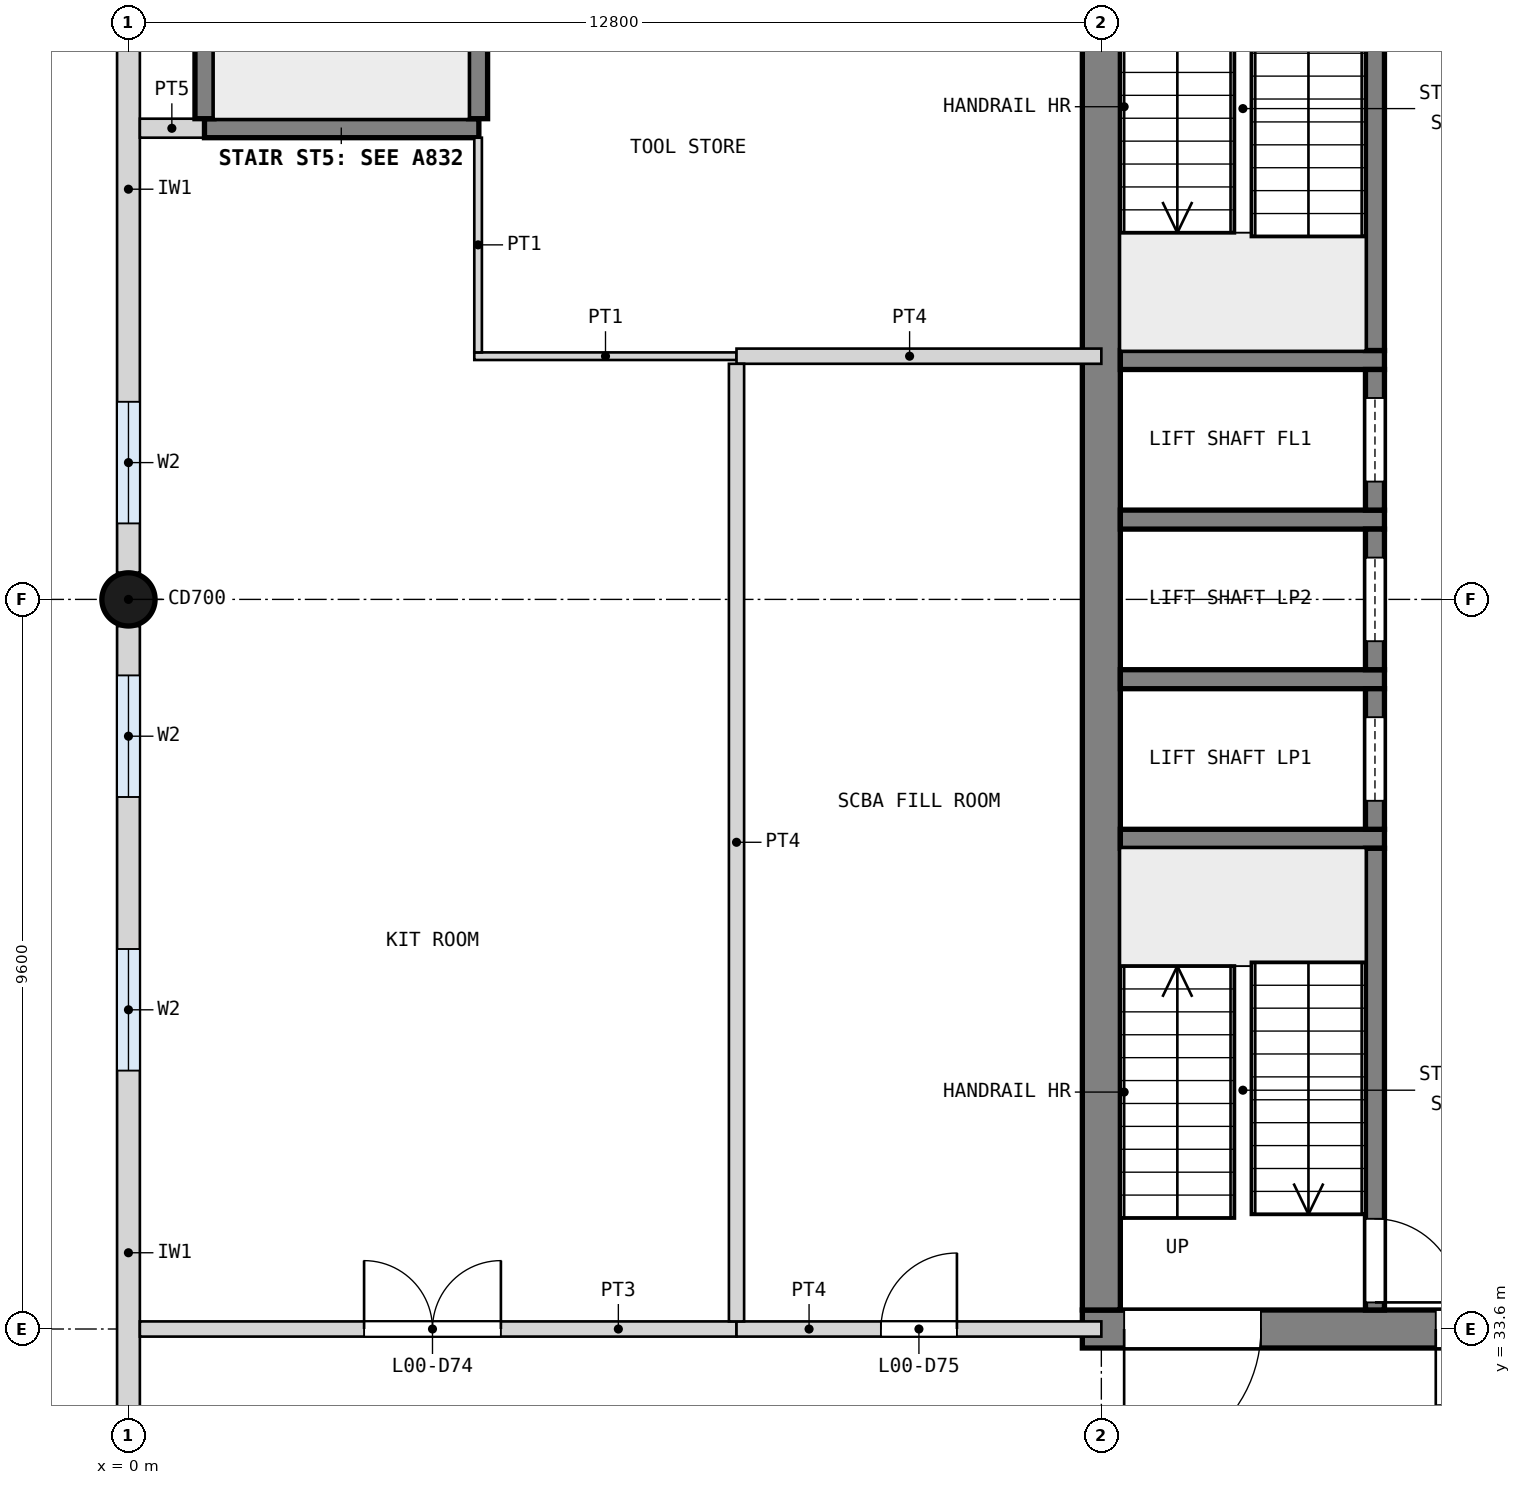
"""IFC4 building model, lengths in metres.
Left out: names, types, materials, properties, quantities, classifications, styles, units other than length and angle.
Written with IfcOpenShell. Run it as: python <this file> out.ifc"""

import sys

from ifc_helpers import new_model, si_unit, direction, frame, frame_2d, origin, origin_2d, place, context, subcontext, project, spatial, rectangle, circle, extrude, element, fill, save


model = new_model("IFC4")
c1 = context("Model", 3, precision=1e-05, world=origin(), true_north=direction((0.0, 1.0)))
c2 = subcontext(c1, "Body", "Model", "MODEL_VIEW")
j1 = project(units=[si_unit("LENGTHUNIT", "METRE"), si_unit("PLANEANGLEUNIT", "RADIAN")], contexts=[c1])
p1 = place(None, origin())
s1 = spatial("IfcSite", under=j1, at=p1, CompositionType="ELEMENT")
p2 = place(p1, origin())
s2 = spatial("IfcBuilding", under=s1, at=p2, CompositionType="ELEMENT")
p3 = place(p2, origin())
s3 = spatial("IfcBuildingStorey", under=s2, at=p3, CompositionType="ELEMENT", Elevation=0.0)
p4 = place(p3, frame((12.55, 33.6, 0.0), z_axis=(0.0, 0.0, 1.0), x_axis=(1.0, 0.0, 0.0)))
e1 = element("IfcWall", 1, at=p4, inside=s3, PredefinedType="SHEAR", context=c2, shape_type="SweptSolid", body=[
    extrude(rectangle(XDim=13.3, YDim=0.5, at=frame_2d((6.65, 0.0))), origin(), (0.0, 0.0, 1.0), 4.2),
])
p5 = place(p4, frame((4.65, 0.0, 0.0)))
e2 = element("IfcOpeningElement", 2, at=p5, cuts=e1, PredefinedType="OPENING", context=c2, shape_type="SweptSolid", body=[
    extrude(rectangle(XDim=2.0, YDim=2.1, at=frame_2d((1.0, 1.05))), frame((0.0, 0.26, 0.0), z_axis=(0.0, -1.0, 0.0), x_axis=(1.0, 0.0, 0.0)), (0.0, 0.0, 1.0), 0.52),
])
p6 = place(p4, frame((0.55, 0.0, 0.0)))
e3 = element("IfcOpeningElement", 3, at=p6, cuts=e1, PredefinedType="OPENING", context=c2, shape_type="SweptSolid", body=[
    extrude(rectangle(XDim=1.8, YDim=2.1, at=frame_2d((0.9, 1.05))), frame((0.0, 0.26, 0.0), z_axis=(0.0, -1.0, 0.0), x_axis=(1.0, 0.0, 0.0)), (0.0, 0.0, 1.0), 0.52),
])
p7 = place(p3, frame((12.8, 33.85, 0.0), z_axis=(0.0, 0.0, 1.0), x_axis=(0.0, 1.0, 0.0)))
e4 = element("IfcWall", 4, at=p7, inside=s3, PredefinedType="SHEAR", context=c2, shape_type="SweptSolid", body=[
    extrude(rectangle(XDim=18.7, YDim=0.5, at=frame_2d((9.35, 0.0))), origin(), (0.0, 0.0, 1.0), 4.2),
])
p8 = place(p3, frame((0.0, 43.2, 0.0), z_axis=(0.0, 0.0, 1.0), x_axis=(1.0, 0.0, 0.0)))
e5 = element("IfcColumn", 5, at=p8, inside=s3, PredefinedType="COLUMN", context=c2, shape_type="SweptSolid", body=[
    extrude(circle(Radius=0.35, at=origin_2d()), origin(), (0.0, 0.0, 1.0), 4.2),
])
p9 = place(p3, frame((0.0, 29.15, 0.0), z_axis=(0.0, 0.0, 1.0), x_axis=(0.0, 1.0, 0.0)))
e6 = element("IfcWall", 6, at=p9, inside=s3, PredefinedType="SOLIDWALL", context=c2, shape_type="SweptSolid", body=[
    extrude(rectangle(XDim=13.7, YDim=0.3, at=frame_2d((6.85, 0.0))), origin(), (0.0, 0.0, 1.0), 3.0),
])
p10 = place(p9, frame((1.05, 0.0, 0.0)))
e7 = element("IfcOpeningElement", 7, at=p10, cuts=e6, PredefinedType="OPENING", context=c2, shape_type="SweptSolid", body=[
    extrude(rectangle(XDim=2.0, YDim=2.1, at=frame_2d((1.0, 1.05))), frame((0.0, 0.16, 0.0), z_axis=(0.0, -1.0, 0.0), x_axis=(1.0, 0.0, 0.0)), (0.0, 0.0, 1.0), 0.32),
])
p11 = place(p9, frame((7.85, 0.0, 0.3)))
e8 = element("IfcOpeningElement", 8, at=p11, cuts=e6, PredefinedType="OPENING", context=c2, shape_type="SweptSolid", body=[
    extrude(rectangle(XDim=1.6, YDim=2.4, at=frame_2d((0.8, 1.2))), frame((0.0, 0.16, 0.0), z_axis=(0.0, -1.0, 0.0), x_axis=(1.0, 0.0, 0.0)), (0.0, 0.0, 1.0), 0.32),
])
p12 = place(p9, frame((11.45, 0.0, 0.3)))
e9 = element("IfcOpeningElement", 9, at=p12, cuts=e6, PredefinedType="OPENING", context=c2, shape_type="SweptSolid", body=[
    extrude(rectangle(XDim=1.6, YDim=2.4, at=frame_2d((0.8, 1.2))), frame((0.0, 0.16, 0.0), z_axis=(0.0, -1.0, 0.0), x_axis=(1.0, 0.0, 0.0)), (0.0, 0.0, 1.0), 0.32),
])
p13 = place(p3, frame((0.0, 43.55, 0.0), z_axis=(0.0, 0.0, 1.0), x_axis=(0.0, 1.0, 0.0)))
e10 = element("IfcWall", 10, at=p13, inside=s3, PredefinedType="SOLIDWALL", context=c2, shape_type="SweptSolid", body=[
    extrude(rectangle(XDim=13.7, YDim=0.3, at=frame_2d((6.85, 0.0))), origin(), (0.0, 0.0, 1.0), 3.0),
])
p14 = place(p13, frame((0.65, 0.0, 0.3)))
e11 = element("IfcOpeningElement", 11, at=p14, cuts=e10, PredefinedType="OPENING", context=c2, shape_type="SweptSolid", body=[
    extrude(rectangle(XDim=1.6, YDim=2.4, at=frame_2d((0.8, 1.2))), frame((0.0, 0.16, 0.0), z_axis=(0.0, -1.0, 0.0), x_axis=(1.0, 0.0, 0.0)), (0.0, 0.0, 1.0), 0.32),
])
p15 = place(p13, frame((7.85, 0.0, 0.3)))
e12 = element("IfcOpeningElement", 12, at=p15, cuts=e10, PredefinedType="OPENING", context=c2, shape_type="SweptSolid", body=[
    extrude(rectangle(XDim=1.6, YDim=2.4, at=frame_2d((0.8, 1.2))), frame((0.0, 0.16, 0.0), z_axis=(0.0, -1.0, 0.0), x_axis=(1.0, 0.0, 0.0)), (0.0, 0.0, 1.0), 0.32),
])
p16 = place(p13, frame((11.45, 0.0, 0.3)))
e13 = element("IfcOpeningElement", 13, at=p16, cuts=e10, PredefinedType="OPENING", context=c2, shape_type="SweptSolid", body=[
    extrude(rectangle(XDim=1.6, YDim=2.4, at=frame_2d((0.8, 1.2))), frame((0.0, 0.16, 0.0), z_axis=(0.0, -1.0, 0.0), x_axis=(1.0, 0.0, 0.0)), (0.0, 0.0, 1.0), 0.32),
])
for number, where, z_axis, x_axis in (
    (14, (13.05, 40.05, 0.0), (0.0, 0.0, 1.0), (1.0, 0.0, 0.0)),
    (15, (13.05, 42.15, 0.0), (0.0, 0.0, 1.0), (1.0, 0.0, 0.0)),
    (16, (13.05, 44.25, 0.0), (0.0, 0.0, 1.0), (1.0, 0.0, 0.0)),
    (17, (13.05, 46.35, 0.0), (0.0, 0.0, 1.0), (1.0, 0.0, 0.0)),
):
    element("IfcWall", number, at=place(p3, frame(where, z_axis=z_axis, x_axis=x_axis)), inside=s3, PredefinedType="SOLIDWALL", context=c2, shape_type="SweptSolid", body=[
        extrude(rectangle(XDim=3.475, YDim=0.25, at=frame_2d((1.737, 0.0))), origin(), (0.0, 0.0, 1.0), 3.9),
    ])
p17 = place(p3, frame((16.4, 33.85, 0.0), z_axis=(0.0, 0.0, 1.0), x_axis=(0.0, 1.0, 0.0)))
e18 = element("IfcWall", 18, at=p17, inside=s3, PredefinedType="SOLIDWALL", context=c2, shape_type="SweptSolid", body=[
    extrude(rectangle(XDim=6.075, YDim=0.25, at=frame_2d((3.038, 0.0))), origin(), (0.0, 0.0, 1.0), 3.9),
])
p18 = place(p17, frame((0.1, 0.0, 0.0)))
e19 = element("IfcOpeningElement", 19, at=p18, cuts=e18, PredefinedType="OPENING", context=c2, shape_type="SweptSolid", body=[
    extrude(rectangle(XDim=1.1, YDim=2.1, at=frame_2d((0.55, 1.05))), frame((0.0, 0.135, 0.0), z_axis=(0.0, -1.0, 0.0), x_axis=(1.0, 0.0, 0.0)), (0.0, 0.0, 1.0), 0.27),
])
p19 = place(p3, frame((16.4, 40.175, 0.0), z_axis=(0.0, 0.0, 1.0), x_axis=(0.0, 1.0, 0.0)))
e20 = element("IfcWall", 20, at=p19, inside=s3, PredefinedType="SOLIDWALL", context=c2, shape_type="SweptSolid", body=[
    extrude(rectangle(XDim=1.85, YDim=0.25, at=frame_2d((0.925, 0.0))), origin(), (0.0, 0.0, 1.0), 3.9),
])
p20 = place(p19, frame((0.375, 0.0, 0.0)))
e21 = element("IfcOpeningElement", 21, at=p20, cuts=e20, PredefinedType="OPENING", context=c2, shape_type="SweptSolid", body=[
    extrude(rectangle(XDim=1.1, YDim=2.1, at=frame_2d((0.55, 1.05))), frame((0.0, 0.135, 0.0), z_axis=(0.0, -1.0, 0.0), x_axis=(1.0, 0.0, 0.0)), (0.0, 0.0, 1.0), 0.27),
])
p21 = place(p3, frame((16.4, 42.275, 0.0), z_axis=(0.0, 0.0, 1.0), x_axis=(0.0, 1.0, 0.0)))
e22 = element("IfcWall", 22, at=p21, inside=s3, PredefinedType="SOLIDWALL", context=c2, shape_type="SweptSolid", body=[
    extrude(rectangle(XDim=1.85, YDim=0.25, at=frame_2d((0.925, 0.0))), origin(), (0.0, 0.0, 1.0), 3.9),
])
p22 = place(p21, frame((0.375, 0.0, 0.0)))
e23 = element("IfcOpeningElement", 23, at=p22, cuts=e22, PredefinedType="OPENING", context=c2, shape_type="SweptSolid", body=[
    extrude(rectangle(XDim=1.1, YDim=2.1, at=frame_2d((0.55, 1.05))), frame((0.0, 0.135, 0.0), z_axis=(0.0, -1.0, 0.0), x_axis=(1.0, 0.0, 0.0)), (0.0, 0.0, 1.0), 0.27),
])
p23 = place(p3, frame((16.4, 44.375, 0.0), z_axis=(0.0, 0.0, 1.0), x_axis=(0.0, 1.0, 0.0)))
e24 = element("IfcWall", 24, at=p23, inside=s3, PredefinedType="SOLIDWALL", context=c2, shape_type="SweptSolid", body=[
    extrude(rectangle(XDim=1.85, YDim=0.25, at=frame_2d((0.925, 0.0))), origin(), (0.0, 0.0, 1.0), 3.9),
])
p24 = place(p23, frame((0.375, 0.0, 0.0)))
e25 = element("IfcOpeningElement", 25, at=p24, cuts=e24, PredefinedType="OPENING", context=c2, shape_type="SweptSolid", body=[
    extrude(rectangle(XDim=1.1, YDim=2.1, at=frame_2d((0.55, 1.05))), frame((0.0, 0.135, 0.0), z_axis=(0.0, -1.0, 0.0), x_axis=(1.0, 0.0, 0.0)), (0.0, 0.0, 1.0), 0.27),
])
p25 = place(p3, frame((16.4, 46.475, 0.0), z_axis=(0.0, 0.0, 1.0), x_axis=(0.0, 1.0, 0.0)))
e26 = element("IfcWall", 26, at=p25, inside=s3, PredefinedType="SOLIDWALL", context=c2, shape_type="SweptSolid", body=[
    extrude(rectangle(XDim=6.075, YDim=0.25, at=frame_2d((3.038, 0.0))), origin(), (0.0, 0.0, 1.0), 3.9),
])
p26 = place(p25, frame((4.875, 0.0, 0.0)))
e27 = element("IfcOpeningElement", 27, at=p26, cuts=e26, PredefinedType="OPENING", context=c2, shape_type="SweptSolid", body=[
    extrude(rectangle(XDim=1.1, YDim=2.1, at=frame_2d((0.55, 1.05))), frame((0.0, 0.135, 0.0), z_axis=(0.0, -1.0, 0.0), x_axis=(1.0, 0.0, 0.0)), (0.0, 0.0, 1.0), 0.27),
])
p27 = place(p3, frame((0.15, 33.6, 0.0), z_axis=(0.0, 0.0, 1.0), x_axis=(1.0, 0.0, 0.0)))
e28 = element("IfcWall", 28, at=p27, inside=s3, PredefinedType="PARTITIONING", context=c2, shape_type="SweptSolid", body=[
    extrude(rectangle(XDim=7.85, YDim=0.2, at=frame_2d((3.925, 0.0))), origin(), (0.0, 0.0, 1.0), 3.9),
])
p28 = place(p27, frame((2.95, 0.0, 0.0)))
e29 = element("IfcOpeningElement", 29, at=p28, cuts=e28, PredefinedType="OPENING", context=c2, shape_type="SweptSolid", body=[
    extrude(rectangle(XDim=1.8, YDim=2.1, at=frame_2d((0.9, 1.05))), frame((0.0, 0.11, 0.0), z_axis=(0.0, -1.0, 0.0), x_axis=(1.0, 0.0, 0.0)), (0.0, 0.0, 1.0), 0.22),
])
p29 = place(p3, frame((8.0, 33.6, 0.0), z_axis=(0.0, 0.0, 1.0), x_axis=(1.0, 0.0, 0.0)))
e30 = element("IfcWall", 30, at=p29, inside=s3, PredefinedType="PARTITIONING", context=c2, shape_type="SweptSolid", body=[
    extrude(rectangle(XDim=4.8, YDim=0.2, at=frame_2d((2.4, 0.0))), origin(), (0.0, 0.0, 1.0), 3.9),
])
p30 = place(p29, frame((1.9, 0.0, 0.0)))
e31 = element("IfcOpeningElement", 31, at=p30, cuts=e30, PredefinedType="OPENING", context=c2, shape_type="SweptSolid", body=[
    extrude(rectangle(XDim=1.0, YDim=2.1, at=frame_2d((0.5, 1.05))), frame((0.0, 0.11, 0.0), z_axis=(0.0, -1.0, 0.0), x_axis=(1.0, 0.0, 0.0)), (0.0, 0.0, 1.0), 0.22),
])
p31 = place(p3, frame((4.55, 46.4, 0.0), z_axis=(0.0, 0.0, 1.0), x_axis=(1.0, 0.0, 0.0)))
e32 = element("IfcWall", 32, at=p31, inside=s3, PredefinedType="PARTITIONING", context=c2, shape_type="SweptSolid", body=[
    extrude(rectangle(XDim=3.45, YDim=0.1, at=frame_2d((1.725, 0.0))), origin(), (0.0, 0.0, 1.0), 3.9),
])
p32 = place(p3, frame((8.0, 46.4, 0.0), z_axis=(0.0, 0.0, 1.0), x_axis=(1.0, 0.0, 0.0)))
e33 = element("IfcWall", 33, at=p32, inside=s3, PredefinedType="PARTITIONING", context=c2, shape_type="SweptSolid", body=[
    extrude(rectangle(XDim=4.8, YDim=0.2, at=frame_2d((2.4, 0.0))), origin(), (0.0, 0.0, 1.0), 3.9),
])
p33 = place(p3, frame((0.15, 49.4, 0.0), z_axis=(0.0, 0.0, 1.0), x_axis=(1.0, 0.0, 0.0)))
e34 = element("IfcWall", 34, at=p33, inside=s3, PredefinedType="PARTITIONING", context=c2, shape_type="SweptSolid", body=[
    extrude(rectangle(XDim=0.85, YDim=0.25, at=frame_2d((0.425, 0.0))), origin(), (0.0, 0.0, 1.0), 3.9),
])
p34 = place(p3, frame((1.0, 49.4, 0.0), z_axis=(0.0, 0.0, 1.0), x_axis=(1.0, 0.0, 0.0)))
e35 = element("IfcWall", 35, at=p34, inside=s3, PredefinedType="SHEAR", context=c2, shape_type="SweptSolid", body=[
    extrude(rectangle(XDim=3.61, YDim=0.25, at=frame_2d((1.805, 0.0))), origin(), (0.0, 0.0, 1.0), 3.9),
])
p35 = place(p3, frame((1.0, 49.525, 0.0), z_axis=(0.0, 0.0, 1.0), x_axis=(0.0, 1.0, 0.0)))
e36 = element("IfcWall", 36, at=p35, inside=s3, PredefinedType="SHEAR", context=c2, shape_type="SweptSolid", body=[
    extrude(rectangle(XDim=5.75, YDim=0.25, at=frame_2d((2.875, 0.0))), origin(), (0.0, 0.0, 1.0), 3.9),
])
p36 = place(p3, frame((4.6, 46.45, 0.0), z_axis=(0.0, 0.0, 1.0), x_axis=(0.0, 1.0, 0.0)))
e37 = element("IfcWall", 37, at=p36, inside=s3, PredefinedType="PARTITIONING", context=c2, shape_type="SweptSolid", body=[
    extrude(rectangle(XDim=2.825, YDim=0.1, at=frame_2d((1.413, 0.0))), origin(), (0.0, 0.0, 1.0), 3.9),
])
p37 = place(p3, frame((4.6, 49.525, 0.0), z_axis=(0.0, 0.0, 1.0), x_axis=(0.0, 1.0, 0.0)))
e38 = element("IfcWall", 38, at=p37, inside=s3, PredefinedType="SHEAR", context=c2, shape_type="SweptSolid", body=[
    extrude(rectangle(XDim=3.175, YDim=0.25, at=frame_2d((1.587, 0.0))), origin(), (0.0, 0.0, 1.0), 3.9),
])
p38 = place(p3, frame((8.0, 33.7, 0.0), z_axis=(0.0, 0.0, 1.0), x_axis=(0.0, 1.0, 0.0)))
e39 = element("IfcWall", 39, at=p38, inside=s3, PredefinedType="PARTITIONING", context=c2, shape_type="SweptSolid", body=[
    extrude(rectangle(XDim=12.6, YDim=0.2, at=frame_2d((6.3, 0.0))), origin(), (0.0, 0.0, 1.0), 3.9),
])
p39 = place(p18, frame((1.1, 0.0, 0.0), z_axis=(0.0, 0.0, 1.0), x_axis=(-1.0, 0.0, 0.0)))
e40 = element("IfcDoor", 40, at=p39, inside=s3, OperationType="SINGLE_SWING_RIGHT", PredefinedType="DOOR", context=c2, shape_type="SweptSolid", body=[
    extrude(rectangle(XDim=1.1, YDim=2.1, at=frame_2d((0.55, 1.05))), frame((0.0, 0.025, 0.0), z_axis=(0.0, -1.0, 0.0), x_axis=(1.0, 0.0, 0.0)), (0.0, 0.0, 1.0), 0.05),
])
fill(e19, e40)
p40 = place(p20, origin())
e41 = element("IfcDoor", 41, at=p40, inside=s3, OperationType="SLIDING_TO_LEFT", PredefinedType="DOOR", context=c2, shape_type="SweptSolid", body=[
    extrude(rectangle(XDim=1.1, YDim=2.1, at=frame_2d((0.55, 1.05))), frame((0.0, 0.025, 0.0), z_axis=(0.0, -1.0, 0.0), x_axis=(1.0, 0.0, 0.0)), (0.0, 0.0, 1.0), 0.05),
])
fill(e21, e41)
p41 = place(p22, origin())
e42 = element("IfcDoor", 42, at=p41, inside=s3, OperationType="SLIDING_TO_LEFT", PredefinedType="DOOR", context=c2, shape_type="SweptSolid", body=[
    extrude(rectangle(XDim=1.1, YDim=2.1, at=frame_2d((0.55, 1.05))), frame((0.0, 0.025, 0.0), z_axis=(0.0, -1.0, 0.0), x_axis=(1.0, 0.0, 0.0)), (0.0, 0.0, 1.0), 0.05),
])
fill(e23, e42)
p42 = place(p24, origin())
e43 = element("IfcDoor", 43, at=p42, inside=s3, OperationType="SLIDING_TO_LEFT", PredefinedType="DOOR", context=c2, shape_type="SweptSolid", body=[
    extrude(rectangle(XDim=1.1, YDim=2.1, at=frame_2d((0.55, 1.05))), frame((0.0, 0.025, 0.0), z_axis=(0.0, -1.0, 0.0), x_axis=(1.0, 0.0, 0.0)), (0.0, 0.0, 1.0), 0.05),
])
fill(e25, e43)
p43 = place(p5, frame((2.0, 0.0, 0.0), z_axis=(0.0, 0.0, 1.0), x_axis=(-1.0, 0.0, 0.0)))
e44 = element("IfcDoor", 44, at=p43, inside=s3, OperationType="DOUBLE_DOOR_SINGLE_SWING", PredefinedType="DOOR", context=c2, shape_type="SweptSolid", body=[
    extrude(rectangle(XDim=2.0, YDim=2.1, at=frame_2d((1.0, 1.05))), frame((0.0, 0.025, 0.0), z_axis=(0.0, -1.0, 0.0), x_axis=(1.0, 0.0, 0.0)), (0.0, 0.0, 1.0), 0.05),
])
fill(e2, e44)
p44 = place(p6, frame((1.8, 0.0, 0.0), z_axis=(0.0, 0.0, 1.0), x_axis=(-1.0, 0.0, 0.0)))
e45 = element("IfcDoor", 45, at=p44, inside=s3, OperationType="SINGLE_SWING_RIGHT", PredefinedType="DOOR", context=c2, shape_type="SweptSolid", body=[
    extrude(rectangle(XDim=1.8, YDim=2.1, at=frame_2d((0.9, 1.05))), frame((0.0, 0.025, 0.0), z_axis=(0.0, -1.0, 0.0), x_axis=(1.0, 0.0, 0.0)), (0.0, 0.0, 1.0), 0.05),
])
fill(e3, e45)
p45 = place(p28, origin())
e46 = element("IfcDoor", 46, at=p45, inside=s3, OperationType="DOUBLE_DOOR_SINGLE_SWING", PredefinedType="DOOR", context=c2, shape_type="SweptSolid", body=[
    extrude(rectangle(XDim=1.8, YDim=2.1, at=frame_2d((0.9, 1.05))), frame((0.0, 0.025, 0.0), z_axis=(0.0, -1.0, 0.0), x_axis=(1.0, 0.0, 0.0)), (0.0, 0.0, 1.0), 0.05),
])
fill(e29, e46)
p46 = place(p30, origin())
e47 = element("IfcDoor", 47, at=p46, inside=s3, OperationType="SINGLE_SWING_RIGHT", PredefinedType="DOOR", context=c2, shape_type="SweptSolid", body=[
    extrude(rectangle(XDim=1.0, YDim=2.1, at=frame_2d((0.5, 1.05))), frame((0.0, 0.025, 0.0), z_axis=(0.0, -1.0, 0.0), x_axis=(1.0, 0.0, 0.0)), (0.0, 0.0, 1.0), 0.05),
])
fill(e31, e47)
p47 = place(p11, origin())
e48 = element("IfcWindow", 48, at=p47, inside=s3, PartitioningType="SINGLE_PANEL", PredefinedType="WINDOW", context=c2, shape_type="SweptSolid", body=[
    extrude(rectangle(XDim=1.6, YDim=2.4, at=frame_2d((0.8, 1.2))), frame((0.0, 0.03, 0.0), z_axis=(0.0, -1.0, 0.0), x_axis=(1.0, 0.0, 0.0)), (0.0, 0.0, 1.0), 0.06),
])
fill(e8, e48)
p48 = place(p12, origin())
e49 = element("IfcWindow", 49, at=p48, inside=s3, PartitioningType="SINGLE_PANEL", PredefinedType="WINDOW", context=c2, shape_type="SweptSolid", body=[
    extrude(rectangle(XDim=1.6, YDim=2.4, at=frame_2d((0.8, 1.2))), frame((0.0, 0.03, 0.0), z_axis=(0.0, -1.0, 0.0), x_axis=(1.0, 0.0, 0.0)), (0.0, 0.0, 1.0), 0.06),
])
fill(e9, e49)
p49 = place(p14, origin())
e50 = element("IfcWindow", 50, at=p49, inside=s3, PartitioningType="SINGLE_PANEL", PredefinedType="WINDOW", context=c2, shape_type="SweptSolid", body=[
    extrude(rectangle(XDim=1.6, YDim=2.4, at=frame_2d((0.8, 1.2))), frame((0.0, 0.03, 0.0), z_axis=(0.0, -1.0, 0.0), x_axis=(1.0, 0.0, 0.0)), (0.0, 0.0, 1.0), 0.06),
])
fill(e11, e50)
save(model, sys.argv[1])
